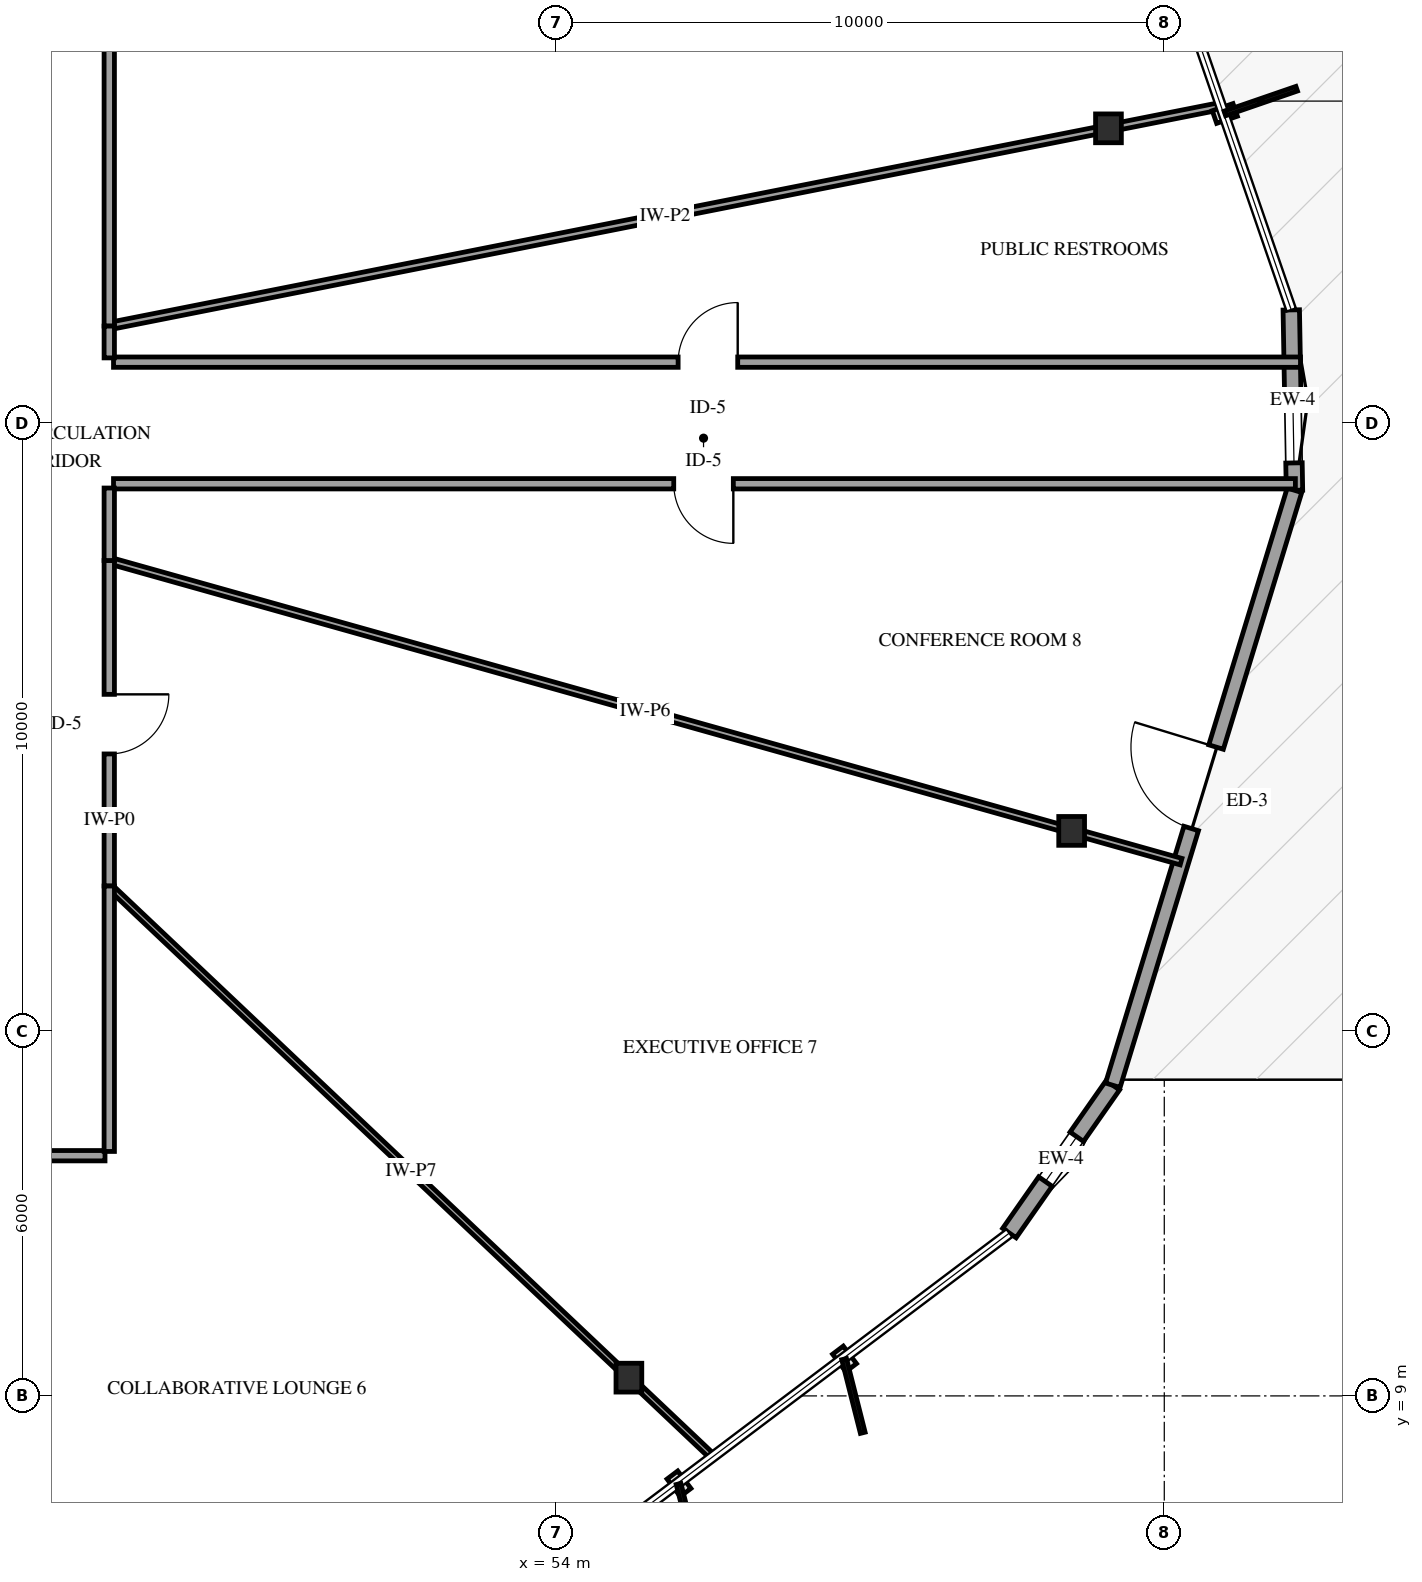
"""IFC4 building model, lengths in metres.
Left out: names, types, materials, properties, quantities, classifications, styles, units other than length and angle.
Written with IfcOpenShell. Run it as: python <this file> out.ifc"""

import sys

from ifc_helpers import new_model, si_unit, direction, frame, frame_2d, origin, origin_2d, place, context, subcontext, project, spatial, rectangle, i_section, extrude, element, fill, save


model = new_model("IFC4")
c1 = context("Model", 3, precision=1e-05, world=origin(), true_north=direction((0.0, 1.0)))
c2 = subcontext(c1, "Body", "Model", "MODEL_VIEW")
j1 = project(units=[si_unit("LENGTHUNIT", "METRE"), si_unit("PLANEANGLEUNIT", "RADIAN")], contexts=[c1])
p1 = place(None, origin())
s1 = spatial("IfcSite", under=j1, at=p1, CompositionType="ELEMENT")
p2 = place(p1, origin())
s2 = spatial("IfcBuilding", under=s1, at=p2, CompositionType="ELEMENT")
p3 = place(p2, frame((0.0, 0.0, 30.6)))
s3 = spatial("IfcBuildingStorey", under=s2, at=p3, CompositionType="ELEMENT", Elevation=30.6)
for number, where, z_axis, x_axis in (
    (1, (63.082, 29.845, -0.3), (0.0, 0.0, 1.0), (1.0, 0.0, 0.0)),
    (2, (55.196, 9.3, -0.3), (0.0, 0.0, 1.0), (1.0, 0.0, 0.0)),
    (3, (62.477, 18.292, -0.3), (0.0, 0.0, 1.0), (1.0, 0.0, 0.0)),
):
    element("IfcColumn", number, at=place(p3, frame(where, z_axis=z_axis, x_axis=x_axis)), inside=s3, PredefinedType="COLUMN", context=c2, shape_type="SweptSolid", body=[
        extrude(i_section(OverallWidth=0.424, OverallDepth=0.474, WebThickness=0.048, FlangeThickness=0.077, FilletRadius=0.038, at=origin_2d()), origin(), (0.0, 0.0, 1.0), 4.3),
    ])
p4 = place(p3, frame((61.453, 11.678, 0.0), z_axis=(0.0, 0.0, 1.0), x_axis=(0.573285584338, 0.819355624128, 0.0)))
e4 = element("IfcWall", 4, at=p4, inside=s3, PredefinedType="SOLIDWALL", context=c2, shape_type="SweptSolid", body=[
    extrude(rectangle(XDim=2.967, YDim=0.27, at=frame_2d((1.483, 0.0))), origin(), (0.0, 0.0, 1.0), 3.079),
])
p5 = place(p4, frame((1.033, 0.0, 0.75)))
e5 = element("IfcOpeningElement", 5, at=p5, cuts=e4, PredefinedType="OPENING", context=c2, shape_type="SweptSolid", body=[
    extrude(rectangle(XDim=0.9, YDim=1.5, at=frame_2d((0.45, 0.75))), frame((0.0, 0.145, 0.0), z_axis=(0.0, -1.0, 0.0), x_axis=(1.0, 0.0, 0.0)), (0.0, 0.0, 1.0), 0.29),
])
p6 = place(p3, frame((66.141, 23.893, 0.0), z_axis=(0.0, 0.0, 1.0), x_axis=(-0.017776431734, 0.999841986753, 0.0)))
e6 = element("IfcWall", 6, at=p6, inside=s3, PredefinedType="SOLIDWALL", context=c2, shape_type="SweptSolid", body=[
    extrude(rectangle(XDim=2.967, YDim=0.27, at=frame_2d((1.483, 0.0))), origin(), (0.0, 0.0, 1.0), 3.079),
])
p7 = place(p6, frame((0.45, 0.0, 0.75)))
e7 = element("IfcOpeningElement", 7, at=p7, cuts=e6, PredefinedType="OPENING", context=c2, shape_type="SweptSolid", body=[
    extrude(rectangle(XDim=0.9, YDim=1.5, at=frame_2d((0.45, 0.75))), frame((0.0, 0.145, 0.0), z_axis=(0.0, -1.0, 0.0), x_axis=(1.0, 0.0, 0.0)), (0.0, 0.0, 1.0), 0.29),
])
p8 = place(p3, frame((63.154, 14.109, 0.0), z_axis=(0.0, 0.0, 1.0), x_axis=(0.292034213335, 0.956407872323, 0.0)))
e8 = element("IfcWall", 8, at=p8, inside=s3, PredefinedType="SOLIDWALL", context=c2, shape_type="SweptSolid", body=[
    extrude(rectangle(XDim=10.23, YDim=0.25, at=frame_2d((5.115, 0.0))), origin(), (0.0, 0.0, 1.0), 3.079),
])
p9 = place(p8, frame((4.415, 0.0, 0.0)))
e9 = element("IfcOpeningElement", 9, at=p9, cuts=e8, PredefinedType="OPENING", context=c2, shape_type="SweptSolid", body=[
    extrude(rectangle(XDim=1.4, YDim=2.2, at=frame_2d((0.7, 1.1))), frame((0.0, 0.135, 0.0), z_axis=(0.0, -1.0, 0.0), x_axis=(1.0, 0.0, 0.0)), (0.0, 0.0, 1.0), 0.27),
])
p10 = place(p3, frame((46.72, 26.0, 0.0), z_axis=(0.0, 0.0, 1.0), x_axis=(1.0, 0.0, 0.0)))
e10 = element("IfcWall", 10, at=p10, inside=s3, PredefinedType="PARTITIONING", context=c2, shape_type="SweptSolid", body=[
    extrude(rectangle(XDim=19.52, YDim=0.17, at=frame_2d((9.76, 0.0))), origin(), (0.0, 0.0, 1.0), 3.7),
])
p11 = place(p10, frame((9.285, 0.0, 0.0)))
e11 = element("IfcOpeningElement", 11, at=p11, cuts=e10, PredefinedType="OPENING", context=c2, shape_type="SweptSolid", body=[
    extrude(rectangle(XDim=0.98, YDim=2.15, at=frame_2d((0.49, 1.075))), frame((0.0, 0.095, 0.0), z_axis=(0.0, -1.0, 0.0), x_axis=(1.0, 0.0, 0.0)), (0.0, 0.0, 1.0), 0.19),
])
p12 = place(p3, frame((66.156, 24.0, 0.0), z_axis=(0.0, 0.0, 1.0), x_axis=(-1.0, 0.0, 0.0)))
e12 = element("IfcWall", 12, at=p12, inside=s3, PredefinedType="PARTITIONING", context=c2, shape_type="SweptSolid", body=[
    extrude(rectangle(XDim=19.436, YDim=0.17, at=frame_2d((9.718, 0.0))), origin(), (0.0, 0.0, 1.0), 3.7),
])
p13 = place(p12, frame((9.243, 0.0, 0.0)))
e13 = element("IfcOpeningElement", 13, at=p13, cuts=e12, PredefinedType="OPENING", context=c2, shape_type="SweptSolid", body=[
    extrude(rectangle(XDim=0.98, YDim=2.15, at=frame_2d((0.49, 1.075))), frame((0.0, 0.095, 0.0), z_axis=(0.0, -1.0, 0.0), x_axis=(1.0, 0.0, 0.0)), (0.0, 0.0, 1.0), 0.19),
])
p14 = place(p3, frame((46.65, 26.593, 0.0), z_axis=(0.0, 0.0, 1.0), x_axis=(0.980968189704, 0.194168511323, 0.0)))
e14 = element("IfcWall", 14, at=p14, inside=s3, PredefinedType="PARTITIONING", context=c2, shape_type="SweptSolid", body=[
    extrude(rectangle(XDim=18.638, YDim=0.12, at=frame_2d((9.319, 0.0))), origin(), (0.0, 0.0, 1.0), 2.995),
])
p15 = place(p3, frame((46.65, 22.738, 0.0), z_axis=(0.0, 0.0, 1.0), x_axis=(0.962724324988, -0.270484517259, 0.0)))
e15 = element("IfcWall", 15, at=p15, inside=s3, PredefinedType="PARTITIONING", context=c2, shape_type="SweptSolid", body=[
    extrude(rectangle(XDim=18.308, YDim=0.11, at=frame_2d((9.154, 0.0))), origin(), (0.0, 0.0, 1.0), 2.995),
])
p16 = place(p3, frame((46.65, 17.385, 0.0), z_axis=(0.0, 0.0, 1.0), x_axis=(0.726425487131, -0.687245233993, 0.0)))
e16 = element("IfcWall", 16, at=p16, inside=s3, PredefinedType="PARTITIONING", context=c2, shape_type="SweptSolid", body=[
    extrude(rectangle(XDim=13.659, YDim=0.1, at=frame_2d((6.83, 0.0))), origin(), (0.0, 0.0, 1.0), 2.995),
])
p17 = place(p3, frame((46.65, 36.98, 0.0), z_axis=(0.0, 0.0, 1.0), x_axis=(0.0, -1.0, 0.0)))
e17 = element("IfcWall", 17, at=p17, inside=s3, PredefinedType="PARTITIONING", context=c2, shape_type="SweptSolid", body=[
    extrude(rectangle(XDim=10.387, YDim=0.17, at=frame_2d((5.193, 0.0))), origin(), (0.0, 0.0, 1.0), 3.7),
])
p18 = place(p3, frame((46.65, 22.738, 0.0), z_axis=(0.0, 0.0, 1.0), x_axis=(0.0, -1.0, 0.0)))
e18 = element("IfcWall", 18, at=p18, inside=s3, PredefinedType="PARTITIONING", context=c2, shape_type="SweptSolid", body=[
    extrude(rectangle(XDim=5.353, YDim=0.17, at=frame_2d((2.677, 0.0))), origin(), (0.0, 0.0, 1.0), 3.7),
])
p19 = place(p18, frame((2.201, 0.0, 0.0)))
e19 = element("IfcOpeningElement", 19, at=p19, cuts=e18, PredefinedType="OPENING", context=c2, shape_type="SweptSolid", body=[
    extrude(rectangle(XDim=0.98, YDim=2.15, at=frame_2d((0.49, 1.075))), frame((0.0, 0.095, 0.0), z_axis=(0.0, -1.0, 0.0), x_axis=(1.0, 0.0, 0.0)), (0.0, 0.0, 1.0), 0.19),
])
p20 = place(p3, frame((46.58, 12.95, 0.0), z_axis=(0.0, 0.0, 1.0), x_axis=(-1.0, 0.0, 0.0)))
e20 = element("IfcWall", 20, at=p20, inside=s3, PredefinedType="PARTITIONING", context=c2, shape_type="SweptSolid", body=[
    extrude(rectangle(XDim=4.486, YDim=0.17, at=frame_2d((2.243, 0.0))), origin(), (0.0, 0.0, 1.0), 3.7),
])
p21 = place(p20, frame((1.768, 0.0, 0.0)))
e21 = element("IfcOpeningElement", 21, at=p21, cuts=e20, PredefinedType="OPENING", context=c2, shape_type="SweptSolid", body=[
    extrude(rectangle(XDim=0.98, YDim=2.15, at=frame_2d((0.49, 1.075))), frame((0.0, 0.095, 0.0), z_axis=(0.0, -1.0, 0.0), x_axis=(1.0, 0.0, 0.0)), (0.0, 0.0, 1.0), 0.19),
])
p22 = place(p3, frame((46.65, 17.385, 0.0), z_axis=(0.0, 0.0, 1.0), x_axis=(0.0, -1.0, 0.0)))
e22 = element("IfcWall", 22, at=p22, inside=s3, PredefinedType="PARTITIONING", context=c2, shape_type="SweptSolid", body=[
    extrude(rectangle(XDim=4.365, YDim=0.17, at=frame_2d((2.183, 0.0))), origin(), (0.0, 0.0, 1.0), 3.7),
])
p23 = place(p3, frame((46.65, 23.93, 0.0), z_axis=(0.0, 0.0, 1.0), x_axis=(0.0, -1.0, 0.0)))
e23 = element("IfcWall", 23, at=p23, inside=s3, PredefinedType="PARTITIONING", context=c2, shape_type="SweptSolid", body=[
    extrude(rectangle(XDim=1.192, YDim=0.17, at=frame_2d((0.596, 0.0))), origin(), (0.0, 0.0, 1.0), 3.7),
])
p24 = place(p3, frame((46.65, 26.593, 0.0), z_axis=(0.0, 0.0, 1.0), x_axis=(0.0, -1.0, 0.0)))
e24 = element("IfcWall", 24, at=p24, inside=s3, PredefinedType="PARTITIONING", context=c2, shape_type="SweptSolid", body=[
    extrude(rectangle(XDim=0.523, YDim=0.17, at=frame_2d((0.261, 0.0))), origin(), (0.0, 0.0, 1.0), 3.7),
])
p25 = place(p5, origin())
e25 = element("IfcWindow", 25, at=p25, inside=s3, PartitioningType="SINGLE_PANEL", PredefinedType="WINDOW", context=c2, shape_type="SweptSolid", body=[
    extrude(rectangle(XDim=0.9, YDim=1.5, at=frame_2d((0.45, 0.75))), frame((0.0, 0.03, 0.0), z_axis=(0.0, -1.0, 0.0), x_axis=(1.0, 0.0, 0.0)), (0.0, 0.0, 1.0), 0.06),
])
fill(e5, e25)
p26 = place(p7, origin())
e26 = element("IfcWindow", 26, at=p26, inside=s3, PartitioningType="SINGLE_PANEL", PredefinedType="WINDOW", context=c2, shape_type="SweptSolid", body=[
    extrude(rectangle(XDim=0.9, YDim=1.5, at=frame_2d((0.45, 0.75))), frame((0.0, 0.03, 0.0), z_axis=(0.0, -1.0, 0.0), x_axis=(1.0, 0.0, 0.0)), (0.0, 0.0, 1.0), 0.06),
])
fill(e7, e26)
p27 = place(p9, origin())
e27 = element("IfcDoor", 27, at=p27, inside=s3, OperationType="SINGLE_SWING_RIGHT", PredefinedType="DOOR", context=c2, shape_type="SweptSolid", body=[
    extrude(rectangle(XDim=1.4, YDim=2.2, at=frame_2d((0.7, 1.1))), frame((0.0, 0.025, 0.0), z_axis=(0.0, -1.0, 0.0), x_axis=(1.0, 0.0, 0.0)), (0.0, 0.0, 1.0), 0.05),
])
fill(e9, e27)
p28 = place(p11, origin())
e28 = element("IfcDoor", 28, at=p28, inside=s3, OperationType="SINGLE_SWING_RIGHT", PredefinedType="DOOR", context=c2, shape_type="SweptSolid", body=[
    extrude(rectangle(XDim=0.98, YDim=2.15, at=frame_2d((0.49, 1.075))), frame((0.0, 0.025, 0.0), z_axis=(0.0, -1.0, 0.0), x_axis=(1.0, 0.0, 0.0)), (0.0, 0.0, 1.0), 0.05),
])
fill(e11, e28)
p29 = place(p13, origin())
e29 = element("IfcDoor", 29, at=p29, inside=s3, OperationType="SINGLE_SWING_LEFT", PredefinedType="DOOR", context=c2, shape_type="SweptSolid", body=[
    extrude(rectangle(XDim=0.98, YDim=2.15, at=frame_2d((0.49, 1.075))), frame((0.0, 0.025, 0.0), z_axis=(0.0, -1.0, 0.0), x_axis=(1.0, 0.0, 0.0)), (0.0, 0.0, 1.0), 0.05),
])
fill(e13, e29)
p30 = place(p19, origin())
e30 = element("IfcDoor", 30, at=p30, inside=s3, OperationType="SINGLE_SWING_LEFT", PredefinedType="DOOR", context=c2, shape_type="SweptSolid", body=[
    extrude(rectangle(XDim=0.98, YDim=2.15, at=frame_2d((0.49, 1.075))), frame((0.0, 0.025, 0.0), z_axis=(0.0, -1.0, 0.0), x_axis=(1.0, 0.0, 0.0)), (0.0, 0.0, 1.0), 0.05),
])
fill(e19, e30)
save(model, sys.argv[1])
